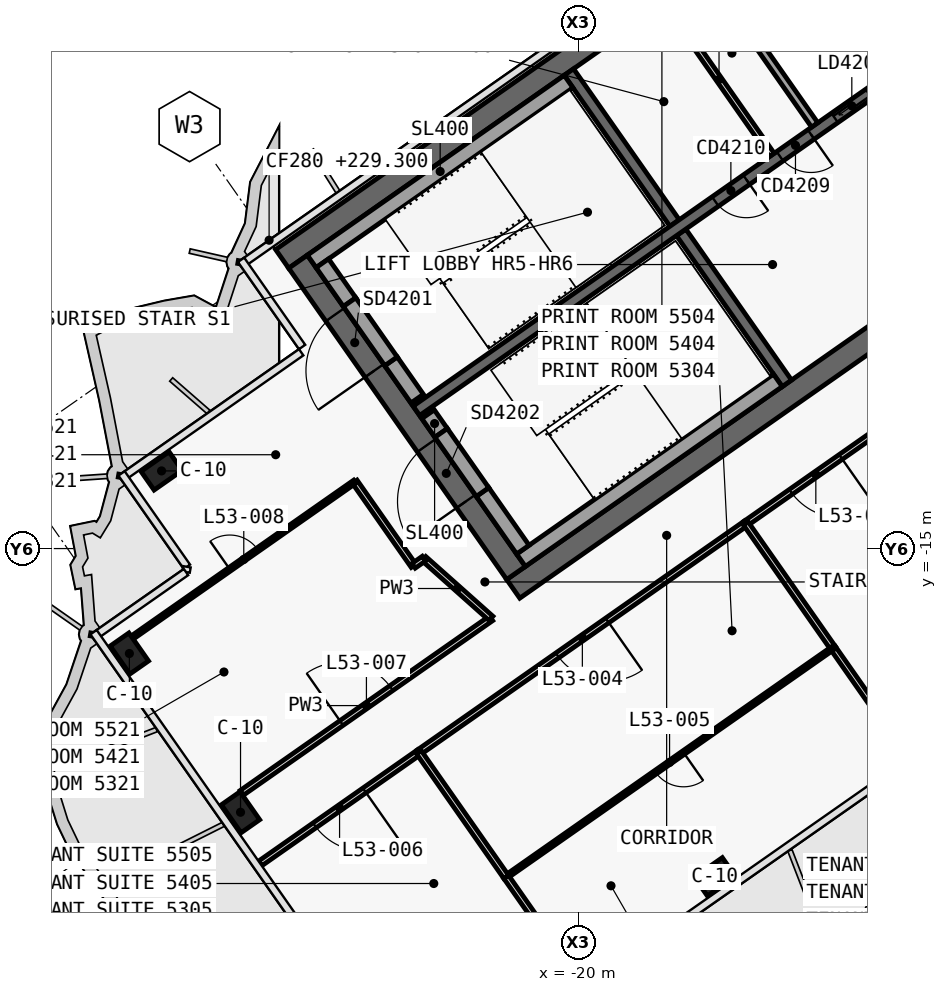
"""IFC4 building model, lengths in metres.
Left out: names, types, materials, properties, quantities, classifications, styles, units other than length and angle.
Written with IfcOpenShell. Run it as: python <this file> out.ifc"""

import sys

from ifc_helpers import new_model, si_unit, direction, frame, frame_2d, origin, origin_2d, place, context, subcontext, project, spatial, polyline, rectangle, outline, extrude, element, fill, save


model = new_model("IFC4")
c1 = context("Model", 3, precision=1e-05, world=origin(), true_north=direction((0.0, 1.0)))
c2 = subcontext(c1, "Body", "Model", "MODEL_VIEW")
j1 = project(units=[si_unit("LENGTHUNIT", "METRE"), si_unit("PLANEANGLEUNIT", "RADIAN")], contexts=[c1])
p1 = place(None, origin())
s1 = spatial("IfcSite", under=j1, at=p1, CompositionType="ELEMENT")
p2 = place(p1, origin())
s2 = spatial("IfcBuilding", under=s1, at=p2, CompositionType="ELEMENT")
p3 = place(p2, frame((0.0, 0.0, 229.3)))
s3 = spatial("IfcBuildingStorey", under=s2, at=p3, CompositionType="ELEMENT", Elevation=229.3)
p4 = place(p3, frame((-0.028, 12.066, 0.0), z_axis=(0.0, 0.0, 1.0), x_axis=(-0.819151382952, -0.573577380837, 0.0)))
e1 = element("IfcWall", 1, at=p4, inside=s3, PredefinedType="SHEAR", context=c2, shape_type="SweptSolid", body=[
    extrude(outline(polyline([(33.898, 0.3), (0.42, 0.3), (0.0, -0.3), (33.898, -0.3), (33.898, 0.3)])), origin(), (0.0, 0.0, 1.0), 3.9),
])
p5 = place(p3, frame((-0.028, -0.874, 0.0), z_axis=(0.0, 0.0, 1.0), x_axis=(-0.819150035022, -0.573579305871, 0.0)))
e2 = element("IfcWall", 2, at=p5, inside=s3, PredefinedType="SHEAR", context=c2, shape_type="SweptSolid", body=[
    extrude(outline(polyline([(26.476, 0.3), (0.42, 0.3), (0.0, -0.3), (26.476, -0.3), (26.476, 0.3)])), origin(), (0.0, 0.0, 1.0), 3.9),
])
p6 = place(p5, frame((2.976, 0.0, 0.0)))
e3 = element("IfcOpeningElement", 3, at=p6, cuts=e2, PredefinedType="OPENING", context=c2, shape_type="SweptSolid", body=[
    extrude(rectangle(XDim=2.4, YDim=2.1, at=frame_2d((1.2, 1.05))), frame((0.0, 0.31, 0.0), z_axis=(0.0, -1.0, 0.0), x_axis=(1.0, 0.0, 0.0)), (0.0, 0.0, 1.0), 0.62),
])
p7 = place(p5, frame((11.776, 0.0, 0.0)))
e4 = element("IfcOpeningElement", 4, at=p7, cuts=e2, PredefinedType="OPENING", context=c2, shape_type="SweptSolid", body=[
    extrude(rectangle(XDim=2.4, YDim=2.1, at=frame_2d((1.2, 1.05))), frame((0.0, 0.31, 0.0), z_axis=(0.0, -1.0, 0.0), x_axis=(1.0, 0.0, 0.0)), (0.0, 0.0, 1.0), 0.62),
])
p8 = place(p3, frame((-21.642, -15.642, 0.0), z_axis=(0.0, 0.0, 1.0), x_axis=(-0.573586866468, 0.819144740944, 0.0)))
e5 = element("IfcWall", 5, at=p8, inside=s3, PredefinedType="SHEAR", context=c2, shape_type="SweptSolid", body=[
    extrude(outline(polyline([(0.0, 0.3), (0.0, -0.3), (10.0, -0.3), (10.0, 0.3), (0.0, 0.3)])), origin(), (0.0, 0.0, 1.0), 3.9),
])
p9 = place(p8, frame((6.5, 0.0, 0.0)))
e6 = element("IfcOpeningElement", 6, at=p9, cuts=e5, PredefinedType="OPENING", context=c2, shape_type="SweptSolid", body=[
    extrude(rectangle(XDim=1.8, YDim=2.1, at=frame_2d((0.9, 1.05))), frame((0.0, 0.31, 0.0), z_axis=(0.0, -1.0, 0.0), x_axis=(1.0, 0.0, 0.0)), (0.0, 0.0, 1.0), 0.62),
])
p10 = place(p8, frame((2.3, 0.0, 0.0)))
e7 = element("IfcOpeningElement", 7, at=p10, cuts=e5, PredefinedType="OPENING", context=c2, shape_type="SweptSolid", body=[
    extrude(rectangle(XDim=1.8, YDim=2.1, at=frame_2d((0.9, 1.05))), frame((0.0, 0.31, 0.0), z_axis=(0.0, -1.0, 0.0), x_axis=(1.0, 0.0, 0.0)), (0.0, 0.0, 1.0), 0.62),
])
p11 = place(p3, frame((-14.515, -10.652, 0.0), z_axis=(0.0, 0.0, 1.0), x_axis=(-0.573560315113, 0.819163332265, 0.0)))
e8 = element("IfcWall", 8, at=p11, inside=s3, PredefinedType="SHEAR", context=c2, shape_type="SweptSolid", body=[
    extrude(outline(polyline([(4.85, 0.15), (0.0, 0.15), (0.0, -0.15), (4.85, -0.15), (4.85, 0.15)])), origin(), (0.0, 0.0, 1.0), 3.9),
])
p12 = place(p3, frame((-17.469, -6.433, 0.0), z_axis=(0.0, 0.0, 1.0), x_axis=(-0.573594092424, 0.81913968109, 0.0)))
e9 = element("IfcWall", 9, at=p12, inside=s3, PredefinedType="SHEAR", context=c2, shape_type="SweptSolid", body=[
    extrude(outline(polyline([(4.85, -0.15), (4.85, 0.15), (0.0, 0.15), (0.0, -0.15), (4.85, -0.15)])), origin(), (0.0, 0.0, 1.0), 3.9),
])
p13 = place(p3, frame((-2.638, 3.768, 0.0), z_axis=(0.0, 0.0, 1.0), x_axis=(-0.819155014212, -0.573572194837, 0.0)))
e10 = element("IfcWall", 10, at=p13, inside=s3, PredefinedType="SHEAR", context=c2, shape_type="SweptSolid", body=[
    extrude(outline(polyline([(26.4, 0.15), (0.0, 0.15), (0.0, -0.15), (26.4, -0.15), (26.4, 0.15)])), origin(), (0.0, 0.0, 1.0), 3.9),
])
p14 = place(p13, frame((1.169, 0.0, 0.0)))
e11 = element("IfcOpeningElement", 11, at=p14, cuts=e10, PredefinedType="OPENING", context=c2, shape_type="SweptSolid", body=[
    extrude(rectangle(XDim=1.1, YDim=2.1, at=frame_2d((0.55, 1.05))), frame((0.0, 0.16, 0.0), z_axis=(0.0, -1.0, 0.0), x_axis=(1.0, 0.0, 0.0)), (0.0, 0.0, 1.0), 0.32),
])
p15 = place(p13, frame((3.206, 0.0, 0.0)))
e12 = element("IfcOpeningElement", 12, at=p15, cuts=e10, PredefinedType="OPENING", context=c2, shape_type="SweptSolid", body=[
    extrude(rectangle(XDim=1.1, YDim=2.1, at=frame_2d((0.55, 1.05))), frame((0.0, 0.16, 0.0), z_axis=(0.0, -1.0, 0.0), x_axis=(1.0, 0.0, 0.0)), (0.0, 0.0, 1.0), 0.32),
])
p16 = place(p13, frame((5.244, 0.0, 0.0)))
e13 = element("IfcOpeningElement", 13, at=p16, cuts=e10, PredefinedType="OPENING", context=c2, shape_type="SweptSolid", body=[
    extrude(rectangle(XDim=1.1, YDim=2.1, at=frame_2d((0.55, 1.05))), frame((0.0, 0.16, 0.0), z_axis=(0.0, -1.0, 0.0), x_axis=(1.0, 0.0, 0.0)), (0.0, 0.0, 1.0), 0.32),
])
p17 = place(p13, frame((7.281, 0.0, 0.0)))
e14 = element("IfcOpeningElement", 14, at=p17, cuts=e10, PredefinedType="OPENING", context=c2, shape_type="SweptSolid", body=[
    extrude(rectangle(XDim=1.1, YDim=2.1, at=frame_2d((0.55, 1.05))), frame((0.0, 0.16, 0.0), z_axis=(0.0, -1.0, 0.0), x_axis=(1.0, 0.0, 0.0)), (0.0, 0.0, 1.0), 0.32),
])
p18 = place(p13, frame((9.688, 0.0, 0.0)))
e15 = element("IfcOpeningElement", 15, at=p18, cuts=e10, PredefinedType="OPENING", context=c2, shape_type="SweptSolid", body=[
    extrude(rectangle(XDim=1.1, YDim=2.1, at=frame_2d((0.55, 1.05))), frame((0.0, 0.16, 0.0), z_axis=(0.0, -1.0, 0.0), x_axis=(1.0, 0.0, 0.0)), (0.0, 0.0, 1.0), 0.32),
])
p19 = place(p13, frame((11.863, 0.0, 0.0)))
e16 = element("IfcOpeningElement", 16, at=p19, cuts=e10, PredefinedType="OPENING", context=c2, shape_type="SweptSolid", body=[
    extrude(rectangle(XDim=1.1, YDim=2.1, at=frame_2d((0.55, 1.05))), frame((0.0, 0.16, 0.0), z_axis=(0.0, -1.0, 0.0), x_axis=(1.0, 0.0, 0.0)), (0.0, 0.0, 1.0), 0.32),
])
p20 = place(p13, frame((13.722, 0.0, 0.0)))
e17 = element("IfcOpeningElement", 17, at=p20, cuts=e10, PredefinedType="OPENING", context=c2, shape_type="SweptSolid", body=[
    extrude(rectangle(XDim=1.0, YDim=2.1, at=frame_2d((0.5, 1.05))), frame((0.0, 0.16, 0.0), z_axis=(0.0, -1.0, 0.0), x_axis=(1.0, 0.0, 0.0)), (0.0, 0.0, 1.0), 0.32),
])
p21 = place(p13, frame((15.798, 0.0, 0.0)))
e18 = element("IfcOpeningElement", 18, at=p21, cuts=e10, PredefinedType="OPENING", context=c2, shape_type="SweptSolid", body=[
    extrude(rectangle(XDim=1.0, YDim=2.1, at=frame_2d((0.5, 1.05))), frame((0.0, 0.16, 0.0), z_axis=(0.0, -1.0, 0.0), x_axis=(1.0, 0.0, 0.0)), (0.0, 0.0, 1.0), 0.32),
])
for number, where, z_axis, x_axis in (
    (19, (-16.41, -23.637, 0.0), (0.0, 0.0, 1.0), (-0.819, -0.574, 0.0)),
    (20, (-30.969, -12.956, 0.0), (0.0, 0.0, 1.0), (-0.819, -0.574, 0.0)),
    (21, (-28.891, -21.939, 0.0), (0.0, 0.0, 1.0), (-0.574, 0.819, 0.0)),
    (22, (-31.816, -17.761, 0.0), (0.0, 0.0, 1.0), (-0.574, 0.819, 0.0)),
):
    element("IfcColumn", number, at=place(p3, frame(where, z_axis=z_axis, x_axis=x_axis)), inside=s3, PredefinedType="COLUMN", context=c2, shape_type="SweptSolid", body=[
        extrude(rectangle(XDim=0.9, YDim=0.6, at=origin_2d()), origin(), (0.0, 0.0, 1.0), 3.9),
    ])
p22 = place(p3, frame((-14.909, -4.641, 0.0), z_axis=(0.0, 0.0, 1.0), x_axis=(-0.573560315113, 0.819163332265, 0.0)))
e23 = element("IfcWall", 23, at=p22, inside=s3, PredefinedType="PARTITIONING", context=c2, shape_type="SweptSolid", body=[
    extrude(rectangle(XDim=4.85, YDim=0.15, at=frame_2d((2.425, 0.0))), origin(), (0.0, 0.0, 1.0), 3.62),
])
p23 = place(p3, frame((-12.001, -2.605, 0.0), z_axis=(0.0, 0.0, 1.0), x_axis=(-0.573560315113, 0.819163332265, 0.0)))
e24 = element("IfcWall", 24, at=p23, inside=s3, PredefinedType="SOLIDWALL", context=c2, shape_type="SweptSolid", body=[
    extrude(rectangle(XDim=4.85, YDim=0.2, at=frame_2d((2.425, 0.0))), origin(), (0.0, 0.0, 1.0), 3.9),
])
p24 = place(p3, frame((-13.783, -3.852, 0.0), z_axis=(0.0, 0.0, 1.0), x_axis=(-0.573594092424, 0.81913968109, 0.0)))
e25 = element("IfcWall", 25, at=p24, inside=s3, PredefinedType="SOLIDWALL", context=c2, shape_type="SweptSolid", body=[
    extrude(rectangle(XDim=4.85, YDim=0.2, at=frame_2d((2.425, 0.0))), origin(), (0.0, 0.0, 1.0), 3.9),
])
p25 = place(p3, frame((-20.259, -2.71, 0.0), z_axis=(0.0, 0.0, 1.0), x_axis=(-0.81914849389, -0.573581506813, 0.0)))
e26 = element("IfcWall", 26, at=p25, inside=s3, PredefinedType="SOLIDWALL", context=c2, shape_type="SweptSolid", body=[
    extrude(rectangle(XDim=8.25, YDim=0.4, at=frame_2d((4.125, 0.0))), origin(), (0.0, 0.0, 1.0), 3.62),
])
p26 = place(p3, frame((-24.244, -11.055, 0.0), z_axis=(0.0, 0.0, 1.0), x_axis=(-0.573571582932, 0.819155442668, 0.0)))
e27 = element("IfcWall", 27, at=p26, inside=s3, PredefinedType="SOLIDWALL", context=c2, shape_type="SweptSolid", body=[
    extrude(rectangle(XDim=1.2, YDim=0.4, at=frame_2d((0.6, 0.0))), origin(), (0.0, 0.0, 1.0), 3.62),
])
p27 = place(p3, frame((-26.022, -8.515, 0.0), z_axis=(0.0, 0.0, 1.0), x_axis=(-0.573619628835, 0.819121798889, 0.0)))
e28 = element("IfcWall", 28, at=p27, inside=s3, PredefinedType="SOLIDWALL", context=c2, shape_type="SweptSolid", body=[
    extrude(rectangle(XDim=1.25, YDim=0.4, at=frame_2d((0.625, 0.0))), origin(), (0.0, 0.0, 1.0), 3.62),
])
p28 = place(p3, frame((-24.932, -10.072, 2.15), z_axis=(0.0, 0.0, 1.0), x_axis=(-0.573591692345, 0.819141361715, 0.0)))
e29 = element("IfcWall", 29, at=p28, inside=s3, PredefinedType="SOLIDWALL", context=c2, shape_type="SweptSolid", body=[
    extrude(rectangle(XDim=1.9, YDim=0.4, at=frame_2d((0.95, 0.0))), origin(), (0.0, 0.0, 1.0), 1.47),
])
p29 = place(p3, frame((-14.753, -10.574, 0.0), z_axis=(0.0, 0.0, 1.0), x_axis=(-0.819158229677, -0.573567602601, 0.0)))
e30 = element("IfcWall", 30, at=p29, inside=s3, PredefinedType="SOLIDWALL", context=c2, shape_type="SweptSolid", body=[
    extrude(rectangle(XDim=8.25, YDim=0.4, at=frame_2d((4.125, 0.0))), origin(), (0.0, 0.0, 1.0), 3.62),
])
p30 = place(p3, frame((-21.462, -15.028, 0.0), z_axis=(0.0, 0.0, 1.0), x_axis=(-0.573559770908, 0.819163713305, 0.0)))
e31 = element("IfcWall", 31, at=p30, inside=s3, PredefinedType="SOLIDWALL", context=c2, shape_type="SweptSolid", body=[
    extrude(rectangle(XDim=1.85, YDim=0.4, at=frame_2d((0.925, 0.0))), origin(), (0.0, 0.0, 1.0), 3.62),
])
p31 = place(p3, frame((-23.613, -11.956, 0.0), z_axis=(0.0, 0.0, 1.0), x_axis=(-0.573435029941, 0.819251039936, 0.0)))
e32 = element("IfcWall", 32, at=p31, inside=s3, PredefinedType="SOLIDWALL", context=c2, shape_type="SweptSolid", body=[
    extrude(rectangle(XDim=0.6, YDim=0.4, at=frame_2d((0.3, 0.0))), origin(), (0.0, 0.0, 1.0), 3.62),
])
p32 = place(p3, frame((-22.523, -13.512, 2.15), z_axis=(0.0, 0.0, 1.0), x_axis=(-0.573591692345, 0.819141361715, 0.0)))
e33 = element("IfcWall", 33, at=p32, inside=s3, PredefinedType="SOLIDWALL", context=c2, shape_type="SweptSolid", body=[
    extrude(rectangle(XDim=1.9, YDim=0.4, at=frame_2d((0.95, 0.0))), origin(), (0.0, 0.0, 1.0), 1.47),
])
p33 = place(p3, frame((-28.858, -21.428, 0.0), z_axis=(0.0, 0.0, 1.0), x_axis=(0.819138799838, 0.573595350923, 0.0)))
e34 = element("IfcWall", 34, at=p33, inside=s3, PredefinedType="PARTITIONING", context=c2, shape_type="SweptSolid", body=[
    extrude(rectangle(XDim=8.007, YDim=0.15, at=frame_2d((4.003, 0.0))), origin(), (0.0, 0.0, 1.0), 3.05),
])
p34 = place(p33, frame((3.204, 0.0, 0.0)))
e35 = element("IfcOpeningElement", 35, at=p34, cuts=e34, PredefinedType="OPENING", context=c2, shape_type="SweptSolid", body=[
    extrude(rectangle(XDim=1.6, YDim=2.1, at=frame_2d((0.8, 1.05))), frame((0.0, 0.085, 0.0), z_axis=(0.0, -1.0, 0.0), x_axis=(1.0, 0.0, 0.0)), (0.0, 0.0, 1.0), 0.17),
])
p35 = place(p3, frame((-11.908, -11.757, 0.0), z_axis=(0.0, 0.0, 1.0), x_axis=(-0.819165703328, -0.573556928727, 0.0)))
e36 = element("IfcWall", 36, at=p35, inside=s3, PredefinedType="PARTITIONING", context=c2, shape_type="SweptSolid", body=[
    extrude(rectangle(XDim=4.504, YDim=0.15, at=frame_2d((2.252, 0.0))), origin(), (0.0, 0.0, 1.0), 3.05),
])
p36 = place(p35, frame((1.452, 0.0, 0.0)))
e37 = element("IfcOpeningElement", 37, at=p36, cuts=e36, PredefinedType="OPENING", context=c2, shape_type="SweptSolid", body=[
    extrude(rectangle(XDim=1.6, YDim=2.1, at=frame_2d((0.8, 1.05))), frame((0.0, 0.085, 0.0), z_axis=(0.0, -1.0, 0.0), x_axis=(1.0, 0.0, 0.0)), (0.0, 0.0, 1.0), 0.17),
])
p37 = place(p3, frame((-15.594, -14.338, 0.0), z_axis=(0.0, 0.0, 1.0), x_axis=(-0.819164214721, -0.57355905478, 0.0)))
e38 = element("IfcWall", 38, at=p37, inside=s3, PredefinedType="PARTITIONING", context=c2, shape_type="SweptSolid", body=[
    extrude(rectangle(XDim=10.504, YDim=0.15, at=frame_2d((5.252, 0.0))), origin(), (0.0, 0.0, 1.0), 3.05),
])
p38 = place(p37, frame((4.452, 0.0, 0.0)))
e39 = element("IfcOpeningElement", 39, at=p38, cuts=e38, PredefinedType="OPENING", context=c2, shape_type="SweptSolid", body=[
    extrude(rectangle(XDim=1.6, YDim=2.1, at=frame_2d((0.8, 1.05))), frame((0.0, 0.085, 0.0), z_axis=(0.0, -1.0, 0.0), x_axis=(1.0, 0.0, 0.0)), (0.0, 0.0, 1.0), 0.17),
])
p39 = place(p3, frame((-24.196, -20.36, 0.0), z_axis=(0.0, 0.0, 1.0), x_axis=(-0.819132992492, -0.573603644176, 0.0)))
e40 = element("IfcWall", 40, at=p39, inside=s3, PredefinedType="PARTITIONING", context=c2, shape_type="SweptSolid", body=[
    extrude(rectangle(XDim=5.102, YDim=0.15, at=frame_2d((2.551, 0.0))), origin(), (0.0, 0.0, 1.0), 3.0),
])
p40 = place(p39, frame((1.751, 0.0, 0.0)))
e41 = element("IfcOpeningElement", 41, at=p40, cuts=e40, PredefinedType="OPENING", context=c2, shape_type="SweptSolid", body=[
    extrude(rectangle(XDim=1.6, YDim=2.1, at=frame_2d((0.8, 1.05))), frame((0.0, 0.085, 0.0), z_axis=(0.0, -1.0, 0.0), x_axis=(1.0, 0.0, 0.0)), (0.0, 0.0, 1.0), 0.17),
])
p41 = place(p3, frame((-24.337, -15.454, 0.0), z_axis=(0.0, 0.0, 1.0), x_axis=(-0.573571492575, 0.819155505936, 0.0)))
e42 = element("IfcWall", 42, at=p41, inside=s3, PredefinedType="PARTITIONING", context=c2, shape_type="SweptSolid", body=[
    extrude(rectangle(XDim=2.702, YDim=0.15, at=frame_2d((1.351, 0.0))), origin(), (0.0, 0.0, 1.0), 3.62),
])
p42 = place(p3, frame((-22.3, -16.837, 0.0), z_axis=(0.0, 0.0, 1.0), x_axis=(-0.746942190663, 0.664888986078, 0.0)))
e43 = element("IfcWall", 43, at=p42, inside=s3, PredefinedType="PARTITIONING", context=c2, shape_type="SweptSolid", body=[
    extrude(rectangle(XDim=2.365, YDim=0.15, at=frame_2d((1.183, 0.0))), origin(), (0.0, 0.0, 1.0), 3.62),
])
p43 = place(p3, frame((-24.067, -15.265, 0.0), z_axis=(0.0, 0.0, 1.0), x_axis=(-0.819092976344, -0.573660784876, 0.0)))
e44 = element("IfcWall", 44, at=p43, inside=s3, PredefinedType="PARTITIONING", context=c2, shape_type="SweptSolid", body=[
    extrude(rectangle(XDim=0.33, YDim=0.15, at=frame_2d((0.165, 0.0))), origin(), (0.0, 0.0, 1.0), 3.62),
])
p44 = place(p3, frame((-31.727, -17.331, 0.0), z_axis=(0.0, 0.0, 1.0), x_axis=(0.819140241507, 0.573593292101, 0.0)))
e45 = element("IfcWall", 45, at=p44, inside=s3, PredefinedType="PARTITIONING", context=c2, shape_type="SweptSolid", body=[
    extrude(rectangle(XDim=7.132, YDim=0.1, at=frame_2d((3.566, 0.0))), origin(), (0.0, 0.0, 1.0), 3.0),
])
p45 = place(p44, frame((3.116, 0.0, 0.0)))
e46 = element("IfcOpeningElement", 46, at=p45, cuts=e45, PredefinedType="OPENING", context=c2, shape_type="SweptSolid", body=[
    extrude(rectangle(XDim=0.9, YDim=2.1, at=frame_2d((0.45, 1.05))), frame((0.0, 0.06, 0.0), z_axis=(0.0, -1.0, 0.0), x_axis=(1.0, 0.0, 0.0)), (0.0, 0.0, 1.0), 0.12),
])
p46 = place(p3, frame((-11.294, -20.482, 0.0), z_axis=(0.0, 0.0, 1.0), x_axis=(-0.573560622794, 0.819163116834, 0.0)))
e47 = element("IfcWall", 47, at=p46, inside=s3, PredefinedType="PARTITIONING", context=c2, shape_type="SweptSolid", body=[
    extrude(rectangle(XDim=3.501, YDim=0.15, at=frame_2d((1.75, 0.0))), origin(), (0.0, 0.0, 1.0), 3.0),
])
p47 = place(p3, frame((-13.301, -17.617, 0.0), z_axis=(0.0, 0.0, 1.0), x_axis=(-0.573560601885, 0.819163131473, 0.0)))
e48 = element("IfcWall", 48, at=p47, inside=s3, PredefinedType="PARTITIONING", context=c2, shape_type="SweptSolid", body=[
    extrude(rectangle(XDim=4.002, YDim=0.15, at=frame_2d((2.001, 0.0))), origin(), (0.0, 0.0, 1.0), 3.62),
])
p48 = place(p3, frame((-13.301, -17.616, 0.0), z_axis=(0.0, 0.0, 1.0), x_axis=(-0.819155448096, -0.573571575181, 0.0)))
e49 = element("IfcWall", 49, at=p48, inside=s3, PredefinedType="PARTITIONING", context=c2, shape_type="SweptSolid", body=[
    extrude(rectangle(XDim=10.5, YDim=0.1, at=frame_2d((5.25, 0.0))), origin(), (0.0, 0.0, 1.0), 3.05),
])
p49 = place(p48, frame((4.8, 0.0, 0.0)))
e50 = element("IfcOpeningElement", 50, at=p49, cuts=e49, PredefinedType="OPENING", context=c2, shape_type="SweptSolid", body=[
    extrude(rectangle(XDim=0.9, YDim=2.1, at=frame_2d((0.45, 1.05))), frame((0.0, 0.06, 0.0), z_axis=(0.0, -1.0, 0.0), x_axis=(1.0, 0.0, 0.0)), (0.0, 0.0, 1.0), 0.12),
])
p50 = place(p3, frame((-19.896, -26.505, 0.0), z_axis=(0.0, 0.0, 1.0), x_axis=(-0.573555999232, 0.819166354134, 0.0)))
e51 = element("IfcWall", 51, at=p50, inside=s3, PredefinedType="PARTITIONING", context=c2, shape_type="SweptSolid", body=[
    extrude(rectangle(XDim=3.499, YDim=0.15, at=frame_2d((1.75, 0.0))), origin(), (0.0, 0.0, 1.0), 3.0),
])
p51 = place(p3, frame((-21.903, -23.638, 0.0), z_axis=(0.0, 0.0, 1.0), x_axis=(-0.573556557423, 0.819165963305, 0.0)))
e52 = element("IfcWall", 52, at=p51, inside=s3, PredefinedType="PARTITIONING", context=c2, shape_type="SweptSolid", body=[
    extrude(rectangle(XDim=4.0, YDim=0.15, at=frame_2d((2.0, 0.0))), origin(), (0.0, 0.0, 1.0), 3.62),
])
p52 = place(p19, origin())
e53 = element("IfcDoor", 53, at=p52, inside=s3, OperationType="SLIDING_TO_RIGHT", PredefinedType="DOOR", context=c2, shape_type="SweptSolid", body=[
    extrude(rectangle(XDim=1.1, YDim=2.1, at=frame_2d((0.55, 1.05))), frame((0.0, 0.025, 0.0), z_axis=(0.0, -1.0, 0.0), x_axis=(1.0, 0.0, 0.0)), (0.0, 0.0, 1.0), 0.05),
])
fill(e16, e53)
p53 = place(p20, origin())
e54 = element("IfcDoor", 54, at=p53, inside=s3, OperationType="SINGLE_SWING_RIGHT", PredefinedType="DOOR", context=c2, shape_type="SweptSolid", body=[
    extrude(rectangle(XDim=1.0, YDim=2.1, at=frame_2d((0.5, 1.05))), frame((0.0, 0.025, 0.0), z_axis=(0.0, -1.0, 0.0), x_axis=(1.0, 0.0, 0.0)), (0.0, 0.0, 1.0), 0.05),
])
fill(e17, e54)
p54 = place(p21, origin())
e55 = element("IfcDoor", 55, at=p54, inside=s3, OperationType="SINGLE_SWING_RIGHT", PredefinedType="DOOR", context=c2, shape_type="SweptSolid", body=[
    extrude(rectangle(XDim=1.0, YDim=2.1, at=frame_2d((0.5, 1.05))), frame((0.0, 0.025, 0.0), z_axis=(0.0, -1.0, 0.0), x_axis=(1.0, 0.0, 0.0)), (0.0, 0.0, 1.0), 0.05),
])
fill(e18, e55)
p55 = place(p9, origin())
e56 = element("IfcDoor", 56, at=p55, inside=s3, OperationType="DOUBLE_DOOR_SINGLE_SWING", PredefinedType="DOOR", context=c2, shape_type="SweptSolid", body=[
    extrude(rectangle(XDim=1.8, YDim=2.1, at=frame_2d((0.9, 1.05))), frame((0.0, 0.025, 0.0), z_axis=(0.0, -1.0, 0.0), x_axis=(1.0, 0.0, 0.0)), (0.0, 0.0, 1.0), 0.05),
])
fill(e6, e56)
p56 = place(p10, origin())
e57 = element("IfcDoor", 57, at=p56, inside=s3, OperationType="DOUBLE_DOOR_SINGLE_SWING", PredefinedType="DOOR", context=c2, shape_type="SweptSolid", body=[
    extrude(rectangle(XDim=1.8, YDim=2.1, at=frame_2d((0.9, 1.05))), frame((0.0, 0.025, 0.0), z_axis=(0.0, -1.0, 0.0), x_axis=(1.0, 0.0, 0.0)), (0.0, 0.0, 1.0), 0.05),
])
fill(e7, e57)
p57 = place(p36, origin())
e58 = element("IfcDoor", 58, at=p57, inside=s3, OperationType="DOUBLE_DOOR_SINGLE_SWING", PredefinedType="DOOR", context=c2, shape_type="SweptSolid", body=[
    extrude(rectangle(XDim=1.6, YDim=2.1, at=frame_2d((0.8, 1.05))), frame((0.0, 0.025, 0.0), z_axis=(0.0, -1.0, 0.0), x_axis=(1.0, 0.0, 0.0)), (0.0, 0.0, 1.0), 0.05),
])
fill(e37, e58)
p58 = place(p38, origin())
e59 = element("IfcDoor", 59, at=p58, inside=s3, OperationType="DOUBLE_DOOR_SINGLE_SWING", PredefinedType="DOOR", context=c2, shape_type="SweptSolid", body=[
    extrude(rectangle(XDim=1.6, YDim=2.1, at=frame_2d((0.8, 1.05))), frame((0.0, 0.025, 0.0), z_axis=(0.0, -1.0, 0.0), x_axis=(1.0, 0.0, 0.0)), (0.0, 0.0, 1.0), 0.05),
])
fill(e39, e59)
p59 = place(p49, origin())
e60 = element("IfcDoor", 60, at=p59, inside=s3, OperationType="SINGLE_SWING_LEFT", PredefinedType="DOOR", context=c2, shape_type="SweptSolid", body=[
    extrude(rectangle(XDim=0.9, YDim=2.1, at=frame_2d((0.45, 1.05))), frame((0.0, 0.025, 0.0), z_axis=(0.0, -1.0, 0.0), x_axis=(1.0, 0.0, 0.0)), (0.0, 0.0, 1.0), 0.05),
])
fill(e50, e60)
p60 = place(p40, origin())
e61 = element("IfcDoor", 61, at=p60, inside=s3, OperationType="DOUBLE_DOOR_SINGLE_SWING", PredefinedType="DOOR", context=c2, shape_type="SweptSolid", body=[
    extrude(rectangle(XDim=1.6, YDim=2.1, at=frame_2d((0.8, 1.05))), frame((0.0, 0.025, 0.0), z_axis=(0.0, -1.0, 0.0), x_axis=(1.0, 0.0, 0.0)), (0.0, 0.0, 1.0), 0.05),
])
fill(e41, e61)
p61 = place(p34, origin())
e62 = element("IfcDoor", 62, at=p61, inside=s3, OperationType="DOUBLE_DOOR_SINGLE_SWING", PredefinedType="DOOR", context=c2, shape_type="SweptSolid", body=[
    extrude(rectangle(XDim=1.6, YDim=2.1, at=frame_2d((0.8, 1.05))), frame((0.0, 0.025, 0.0), z_axis=(0.0, -1.0, 0.0), x_axis=(1.0, 0.0, 0.0)), (0.0, 0.0, 1.0), 0.05),
])
fill(e35, e62)
p62 = place(p45, origin())
e63 = element("IfcDoor", 63, at=p62, inside=s3, OperationType="SINGLE_SWING_RIGHT", PredefinedType="DOOR", context=c2, shape_type="SweptSolid", body=[
    extrude(rectangle(XDim=0.9, YDim=2.1, at=frame_2d((0.45, 1.05))), frame((0.0, 0.025, 0.0), z_axis=(0.0, -1.0, 0.0), x_axis=(1.0, 0.0, 0.0)), (0.0, 0.0, 1.0), 0.05),
])
fill(e46, e63)
save(model, sys.argv[1])
